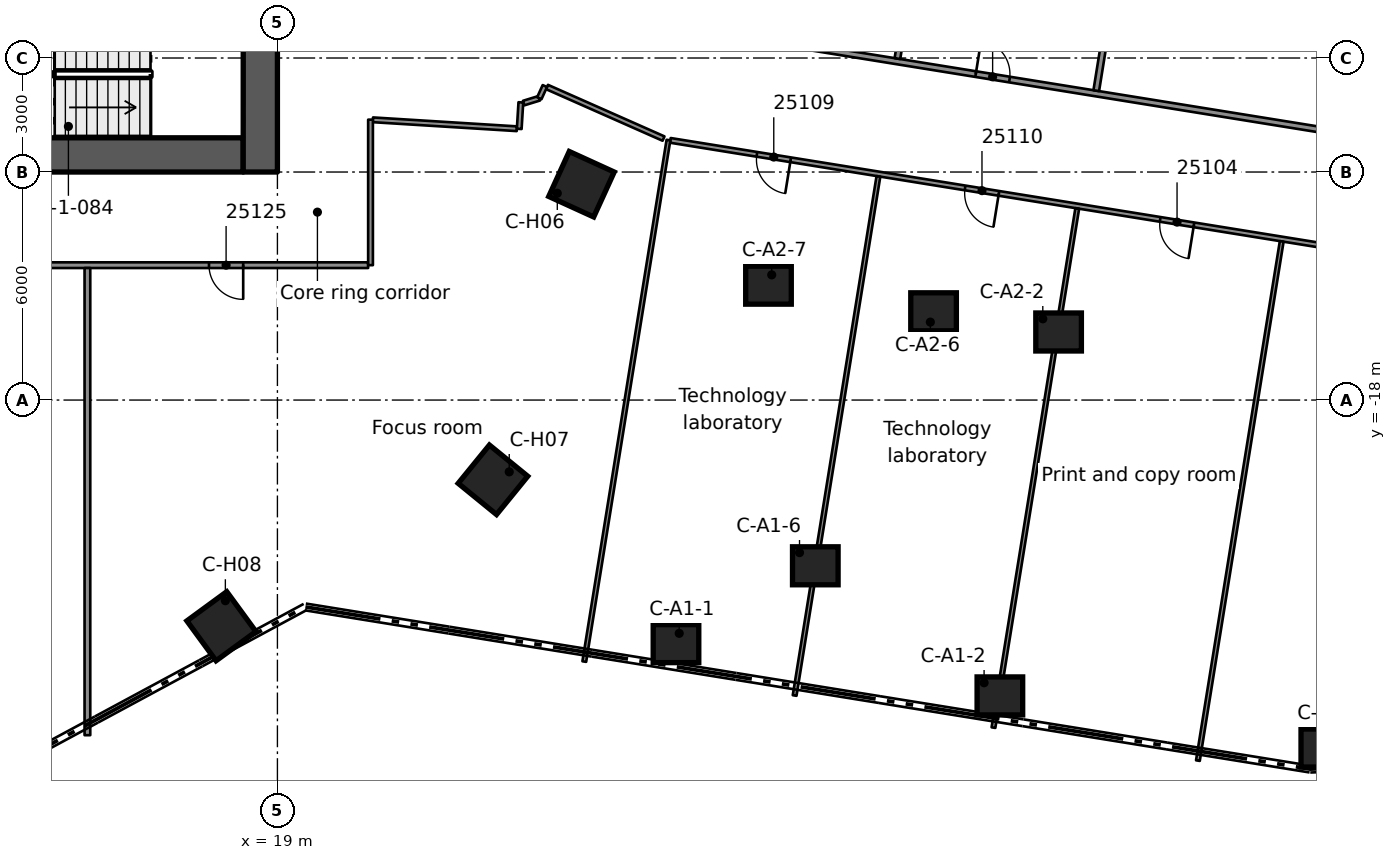
"""IFC4 building model, lengths in metres.
Left out: names, types, materials, properties, quantities, classifications, styles, units other than length and angle.
Written with IfcOpenShell. Run it as: python <this file> out.ifc"""

import sys

from ifc_helpers import new_model, si_unit, direction, frame, frame_2d, origin, origin_2d, place, context, subcontext, project, spatial, rectangle, extrude, element, fill, save


model = new_model("IFC4")
c1 = context("Model", 3, precision=1e-05, world=origin(), true_north=direction((0.0, 1.0)))
c2 = subcontext(c1, "Body", "Model", "MODEL_VIEW")
j1 = project(units=[si_unit("LENGTHUNIT", "METRE"), si_unit("PLANEANGLEUNIT", "RADIAN")], contexts=[c1])
p1 = place(None, origin())
s1 = spatial("IfcSite", under=j1, at=p1, CompositionType="ELEMENT")
p2 = place(p1, origin())
s2 = spatial("IfcBuilding", under=s1, at=p2, CompositionType="ELEMENT")
p3 = place(p2, frame((0.0, 0.0, 127.2)))
s3 = spatial("IfcBuildingStorey", under=s2, at=p3, CompositionType="ELEMENT", Elevation=127.2)
p4 = place(p3, frame((8.9, -11.55, 0.0), z_axis=(0.0, 0.0, 1.0), x_axis=(1.0, 0.0, 0.0)))
e1 = element("IfcWall", 1, at=p4, inside=s3, PredefinedType="SHEAR", context=c2, shape_type="SweptSolid", body=[
    extrude(rectangle(XDim=9.2, YDim=0.9, at=frame_2d((4.6, 0.0))), origin(), (0.0, 0.0, 1.0), 3.5),
])
p5 = place(p4, frame((3.0, 0.0, 0.0)))
e2 = element("IfcOpeningElement", 2, at=p5, cuts=e1, PredefinedType="OPENING", context=c2, shape_type="SweptSolid", body=[
    extrude(rectangle(XDim=1.1, YDim=2.1, at=frame_2d((0.55, 1.05))), frame((0.0, 0.46, 0.0), z_axis=(0.0, -1.0, 0.0), x_axis=(1.0, 0.0, 0.0)), (0.0, 0.0, 1.0), 0.92),
])
p6 = place(p3, frame((18.55, -12.0, 0.0), z_axis=(0.0, 0.0, 1.0), x_axis=(0.0, 1.0, 0.0)))
e3 = element("IfcWall", 3, at=p6, inside=s3, PredefinedType="SHEAR", context=c2, shape_type="SweptSolid", body=[
    extrude(rectangle(XDim=24.0, YDim=0.9, at=frame_2d((12.0, 0.0))), origin(), (0.0, 0.0, 1.0), 3.5),
])
p7 = place(p6, frame((12.1, 0.0, 0.0)))
e4 = element("IfcOpeningElement", 4, at=p7, cuts=e3, PredefinedType="OPENING", context=c2, shape_type="SweptSolid", body=[
    extrude(rectangle(XDim=1.8, YDim=2.1, at=frame_2d((0.9, 1.05))), frame((0.0, 0.46, 0.0), z_axis=(0.0, -1.0, 0.0), x_axis=(1.0, 0.0, 0.0)), (0.0, 0.0, 1.0), 0.92),
])
for number, where, z_axis, x_axis in (
    (5, (29.488, -24.409, 0.0), (0.0, 0.0, 1.0), (1.0, 0.0, 0.0)),
    (6, (38.011, -25.785, 0.0), (0.0, 0.0, 1.0), (1.0, 0.0, 0.0)),
    (7, (46.535, -27.156, 0.0), (0.0, 0.0, 1.0), (1.0, 0.0, 0.0)),
    (8, (33.154, -22.361, 0.0), (0.0, 0.0, 1.0), (1.0, 0.0, 0.0)),
    (9, (39.556, -16.209, 0.0), (0.0, 0.0, 1.0), (1.0, 0.0, 0.0)),
    (10, (36.266, -15.678, 0.0), (0.0, 0.0, 1.0), (1.0, 0.0, 0.0)),
    (11, (31.922, -14.977, 0.0), (0.0, 0.0, 1.0), (1.0, 0.0, 0.0)),
):
    element("IfcColumn", number, at=place(p3, frame(where, z_axis=z_axis, x_axis=x_axis)), inside=s3, PredefinedType="COLUMN", context=c2, shape_type="SweptSolid", body=[
        extrude(rectangle(XDim=1.2, YDim=1.0, at=origin_2d()), origin(), (0.0, 0.0, 1.0), 3.5),
    ])
for number, where, z_axis, x_axis in (
    (12, (27.001, -12.321, 0.0), (0.0, 0.0, 1.0), (0.91, -0.415, 0.0)),
    (13, (24.672, -20.098, 0.0), (0.0, 0.0, 1.0), (0.775, -0.632, 0.0)),
    (14, (17.526, -23.951, 0.0), (0.0, 0.0, 1.0), (0.591, -0.807, 0.0)),
):
    element("IfcColumn", number, at=place(p3, frame(where, z_axis=z_axis, x_axis=x_axis)), inside=s3, PredefinedType="COLUMN", context=c2, shape_type="SweptSolid", body=[
        extrude(rectangle(XDim=1.3, YDim=1.3, at=origin_2d()), origin(), (0.0, 0.0, 1.0), 3.5),
    ])
p8 = place(p3, frame((26.094, -9.763, 0.0), z_axis=(0.0, 0.0, 1.0), x_axis=(0.914414080566, -0.404780050475, 0.0)))
e15 = element("IfcWall", 15, at=p8, inside=s3, PredefinedType="PARTITIONING", context=c2, shape_type="SweptSolid", body=[
    extrude(rectangle(XDim=3.353, YDim=0.125, at=frame_2d((1.676, 0.0))), origin(), (0.0, 0.0, 1.0), 3.08),
])
p9 = place(p3, frame((25.479, -10.186, 0.0), z_axis=(0.0, 0.0, 1.0), x_axis=(0.955681025049, 0.294404107243, 0.0)))
e16 = element("IfcWall", 16, at=p9, inside=s3, PredefinedType="PARTITIONING", context=c2, shape_type="SweptSolid", body=[
    extrude(rectangle(XDim=0.431, YDim=0.125, at=frame_2d((0.216, 0.0))), origin(), (0.0, 0.0, 1.0), 3.08),
])
p10 = place(p3, frame((53.719, -15.1, 0.0), z_axis=(0.0, 0.0, 1.0), x_axis=(-0.987235605508, 0.159266629328, 0.0)))
e17 = element("IfcWall", 17, at=p10, inside=s3, PredefinedType="PARTITIONING", context=c2, shape_type="SweptSolid", body=[
    extrude(rectangle(XDim=24.695, YDim=0.125, at=frame_2d((12.348, 0.0))), origin(), (0.0, 0.0, 1.0), 3.08),
])
p11 = place(p10, frame((10.739, 0.0, 0.0)))
e18 = element("IfcOpeningElement", 18, at=p11, cuts=e17, PredefinedType="OPENING", context=c2, shape_type="SweptSolid", body=[
    extrude(rectangle(XDim=0.9, YDim=2.1, at=frame_2d((0.45, 1.05))), frame((0.0, 0.073, 0.0), z_axis=(0.0, -1.0, 0.0), x_axis=(1.0, 0.0, 0.0)), (0.0, 0.0, 1.0), 0.145),
])
p12 = place(p10, frame((1.038, 0.0, 0.0)))
e19 = element("IfcOpeningElement", 19, at=p12, cuts=e17, PredefinedType="OPENING", context=c2, shape_type="SweptSolid", body=[
    extrude(rectangle(XDim=0.9, YDim=2.1, at=frame_2d((0.45, 1.05))), frame((0.0, 0.073, 0.0), z_axis=(0.0, -1.0, 0.0), x_axis=(1.0, 0.0, 0.0)), (0.0, 0.0, 1.0), 0.145),
])
p13 = place(p10, frame((21.488, 0.0, 0.0)))
e20 = element("IfcOpeningElement", 20, at=p13, cuts=e17, PredefinedType="OPENING", context=c2, shape_type="SweptSolid", body=[
    extrude(rectangle(XDim=0.9, YDim=2.1, at=frame_2d((0.45, 1.05))), frame((0.0, 0.073, 0.0), z_axis=(0.0, -1.0, 0.0), x_axis=(1.0, 0.0, 0.0)), (0.0, 0.0, 1.0), 0.145),
])
p14 = place(p10, frame((15.938, 0.0, 0.0)))
e21 = element("IfcOpeningElement", 21, at=p14, cuts=e17, PredefinedType="OPENING", context=c2, shape_type="SweptSolid", body=[
    extrude(rectangle(XDim=0.9, YDim=2.1, at=frame_2d((0.45, 1.05))), frame((0.0, 0.073, 0.0), z_axis=(0.0, -1.0, 0.0), x_axis=(1.0, 0.0, 0.0)), (0.0, 0.0, 1.0), 0.145),
])
p15 = place(p3, frame((29.885, -8.215, 0.0), z_axis=(0.0, 0.0, 1.0), x_axis=(0.987236652076, -0.1592601419, 0.0)))
e22 = element("IfcWall", 22, at=p15, inside=s3, PredefinedType="PARTITIONING", context=c2, shape_type="SweptSolid", body=[
    extrude(rectangle(XDim=21.612, YDim=0.15, at=frame_2d((10.806, 0.0))), origin(), (0.0, 0.0, 1.0), 3.08),
])
p16 = place(p15, frame((7.588, 0.0, 0.0)))
e23 = element("IfcOpeningElement", 23, at=p16, cuts=e22, PredefinedType="OPENING", context=c2, shape_type="SweptSolid", body=[
    extrude(rectangle(XDim=0.9, YDim=2.1, at=frame_2d((0.45, 1.05))), frame((0.0, 0.085, 0.0), z_axis=(0.0, -1.0, 0.0), x_axis=(1.0, 0.0, 0.0)), (0.0, 0.0, 1.0), 0.17),
])
p17 = place(p3, frame((21.512, -10.626, 0.0), z_axis=(0.0, 0.0, 1.0), x_axis=(0.998079516633, -0.061945770464, 0.0)))
e24 = element("IfcWall", 24, at=p17, inside=s3, PredefinedType="PARTITIONING", context=c2, shape_type="SweptSolid", body=[
    extrude(rectangle(XDim=3.795, YDim=0.125, at=frame_2d((1.898, 0.0))), origin(), (0.0, 0.0, 1.0), 3.08),
])
p18 = place(p3, frame((21.387, -14.451, 0.0), z_axis=(0.0, 0.0, 1.0), x_axis=(-1.0, 0.0, 0.0)))
e25 = element("IfcWall", 25, at=p18, inside=s3, PredefinedType="PARTITIONING", context=c2, shape_type="SweptSolid", body=[
    extrude(rectangle(XDim=10.996, YDim=0.15, at=frame_2d((5.498, 0.0))), origin(), (0.0, 0.0, 1.0), 3.08),
])
p19 = place(p18, frame((3.288, 0.0, 0.0)))
e26 = element("IfcOpeningElement", 26, at=p19, cuts=e25, PredefinedType="OPENING", context=c2, shape_type="SweptSolid", body=[
    extrude(rectangle(XDim=0.9, YDim=2.1, at=frame_2d((0.45, 1.05))), frame((0.0, 0.085, 0.0), z_axis=(0.0, -1.0, 0.0), x_axis=(1.0, 0.0, 0.0)), (0.0, 0.0, 1.0), 0.17),
])
p20 = place(p3, frame((25.891, -10.059, 0.0), z_axis=(0.0, 0.0, 1.0), x_axis=(0.413959403351, 0.910295343489, 0.0)))
e27 = element("IfcWall", 27, at=p20, inside=s3, PredefinedType="PARTITIONING", context=c2, shape_type="SweptSolid", body=[
    extrude(rectangle(XDim=0.353, YDim=0.125, at=frame_2d((0.176, 0.0))), origin(), (0.0, 0.0, 1.0), 3.08),
])
p21 = place(p3, frame((43.222, -27.487, 0.0), z_axis=(0.0, 0.0, 1.0), x_axis=(0.159350032698, 0.987222146773, 0.0)))
e28 = element("IfcWall", 28, at=p21, inside=s3, PredefinedType="PARTITIONING", context=c2, shape_type="SweptSolid", body=[
    extrude(rectangle(XDim=13.838, YDim=0.1, at=frame_2d((6.919, 0.0))), origin(), (0.0, 0.0, 1.0), 3.08),
])
p22 = place(p3, frame((37.842, -26.619, 0.0), z_axis=(0.0, 0.0, 1.0), x_axis=(0.159352808208, 0.987221698767, 0.0)))
e29 = element("IfcWall", 29, at=p22, inside=s3, PredefinedType="PARTITIONING", context=c2, shape_type="SweptSolid", body=[
    extrude(rectangle(XDim=13.838, YDim=0.1, at=frame_2d((6.919, 0.0))), origin(), (0.0, 0.0, 1.0), 3.08),
])
p23 = place(p3, frame((40.547, -9.859, 0.0), z_axis=(0.0, 0.0, 1.0), x_axis=(0.159269947871, 0.987235070135, 0.0)))
e30 = element("IfcWall", 30, at=p23, inside=s3, PredefinedType="PARTITIONING", context=c2, shape_type="SweptSolid", body=[
    extrude(rectangle(XDim=6.548, YDim=0.15, at=frame_2d((3.274, 0.0))), origin(), (0.0, 0.0, 1.0), 3.08),
])
p24 = place(p3, frame((32.61, -25.774, 0.0), z_axis=(0.0, 0.0, 1.0), x_axis=(0.159346714874, 0.987222682306, 0.0)))
e31 = element("IfcWall", 31, at=p24, inside=s3, PredefinedType="PARTITIONING", context=c2, shape_type="SweptSolid", body=[
    extrude(rectangle(XDim=13.837, YDim=0.1, at=frame_2d((6.918, 0.0))), origin(), (0.0, 0.0, 1.0), 3.08),
])
p25 = place(p3, frame((35.315, -9.015, 0.0), z_axis=(0.0, 0.0, 1.0), x_axis=(0.159269947871, 0.987235070135, 0.0)))
e32 = element("IfcWall", 32, at=p25, inside=s3, PredefinedType="PARTITIONING", context=c2, shape_type="SweptSolid", body=[
    extrude(rectangle(XDim=6.548, YDim=0.15, at=frame_2d((3.274, 0.0))), origin(), (0.0, 0.0, 1.0), 3.08),
])
p26 = place(p3, frame((27.075, -24.881, 0.0), z_axis=(0.0, 0.0, 1.0), x_axis=(0.159361105938, 0.987220359349, 0.0)))
e33 = element("IfcWall", 33, at=p26, inside=s3, PredefinedType="PARTITIONING", context=c2, shape_type="SweptSolid", body=[
    extrude(rectangle(XDim=13.9, YDim=0.1, at=frame_2d((6.95, 0.0))), origin(), (0.0, 0.0, 1.0), 3.08),
])
p27 = place(p3, frame((25.363, -10.865, 0.0), z_axis=(0.0, 0.0, 1.0), x_axis=(0.061443671654, 0.998110552601, 0.0)))
e34 = element("IfcWall", 34, at=p27, inside=s3, PredefinedType="PARTITIONING", context=c2, shape_type="SweptSolid", body=[
    extrude(rectangle(XDim=0.699, YDim=0.125, at=frame_2d((0.35, 0.0))), origin(), (0.0, 0.0, 1.0), 3.08),
])
p28 = place(p3, frame((21.45, -14.451, 0.0), z_axis=(0.0, 0.0, 1.0), x_axis=(0.0, 1.0, 0.0)))
e35 = element("IfcWall", 35, at=p28, inside=s3, PredefinedType="PARTITIONING", context=c2, shape_type="SweptSolid", body=[
    extrude(rectangle(XDim=3.829, YDim=0.125, at=frame_2d((1.915, 0.0))), origin(), (0.0, 0.0, 1.0), 3.08),
])
p29 = place(p3, frame((14.0, -26.818, 0.0), z_axis=(0.0, 0.0, 1.0), x_axis=(0.0, 1.0, 0.0)))
e36 = element("IfcWall", 36, at=p29, inside=s3, PredefinedType="PARTITIONING", context=c2, shape_type="SweptSolid", body=[
    extrude(rectangle(XDim=12.292, YDim=0.15, at=frame_2d((6.146, 0.0))), origin(), (0.0, 0.0, 1.0), 3.08),
])
p30 = place(p16, origin())
e37 = element("IfcDoor", 37, at=p30, inside=s3, OperationType="SINGLE_SWING_LEFT", PredefinedType="DOOR", context=c2, shape_type="SweptSolid", body=[
    extrude(rectangle(XDim=0.9, YDim=2.1, at=frame_2d((0.45, 1.05))), frame((0.0, 0.025, 0.0), z_axis=(0.0, -1.0, 0.0), x_axis=(1.0, 0.0, 0.0)), (0.0, 0.0, 1.0), 0.05),
])
fill(e23, e37)
p31 = place(p11, origin())
e38 = element("IfcDoor", 38, at=p31, inside=s3, OperationType="SINGLE_SWING_LEFT", PredefinedType="DOOR", context=c2, shape_type="SweptSolid", body=[
    extrude(rectangle(XDim=0.9, YDim=2.1, at=frame_2d((0.45, 1.05))), frame((0.0, 0.025, 0.0), z_axis=(0.0, -1.0, 0.0), x_axis=(1.0, 0.0, 0.0)), (0.0, 0.0, 1.0), 0.05),
])
fill(e18, e38)
p32 = place(p13, origin())
e39 = element("IfcDoor", 39, at=p32, inside=s3, OperationType="SINGLE_SWING_RIGHT", PredefinedType="DOOR", context=c2, shape_type="SweptSolid", body=[
    extrude(rectangle(XDim=0.9, YDim=2.1, at=frame_2d((0.45, 1.05))), frame((0.0, 0.025, 0.0), z_axis=(0.0, -1.0, 0.0), x_axis=(1.0, 0.0, 0.0)), (0.0, 0.0, 1.0), 0.05),
])
fill(e20, e39)
p33 = place(p14, origin())
e40 = element("IfcDoor", 40, at=p33, inside=s3, OperationType="SINGLE_SWING_RIGHT", PredefinedType="DOOR", context=c2, shape_type="SweptSolid", body=[
    extrude(rectangle(XDim=0.9, YDim=2.1, at=frame_2d((0.45, 1.05))), frame((0.0, 0.025, 0.0), z_axis=(0.0, -1.0, 0.0), x_axis=(1.0, 0.0, 0.0)), (0.0, 0.0, 1.0), 0.05),
])
fill(e21, e40)
p34 = place(p19, origin())
e41 = element("IfcDoor", 41, at=p34, inside=s3, OperationType="SINGLE_SWING_LEFT", PredefinedType="DOOR", context=c2, shape_type="SweptSolid", body=[
    extrude(rectangle(XDim=0.9, YDim=2.1, at=frame_2d((0.45, 1.05))), frame((0.0, 0.025, 0.0), z_axis=(0.0, -1.0, 0.0), x_axis=(1.0, 0.0, 0.0)), (0.0, 0.0, 1.0), 0.05),
])
fill(e26, e41)
save(model, sys.argv[1])
